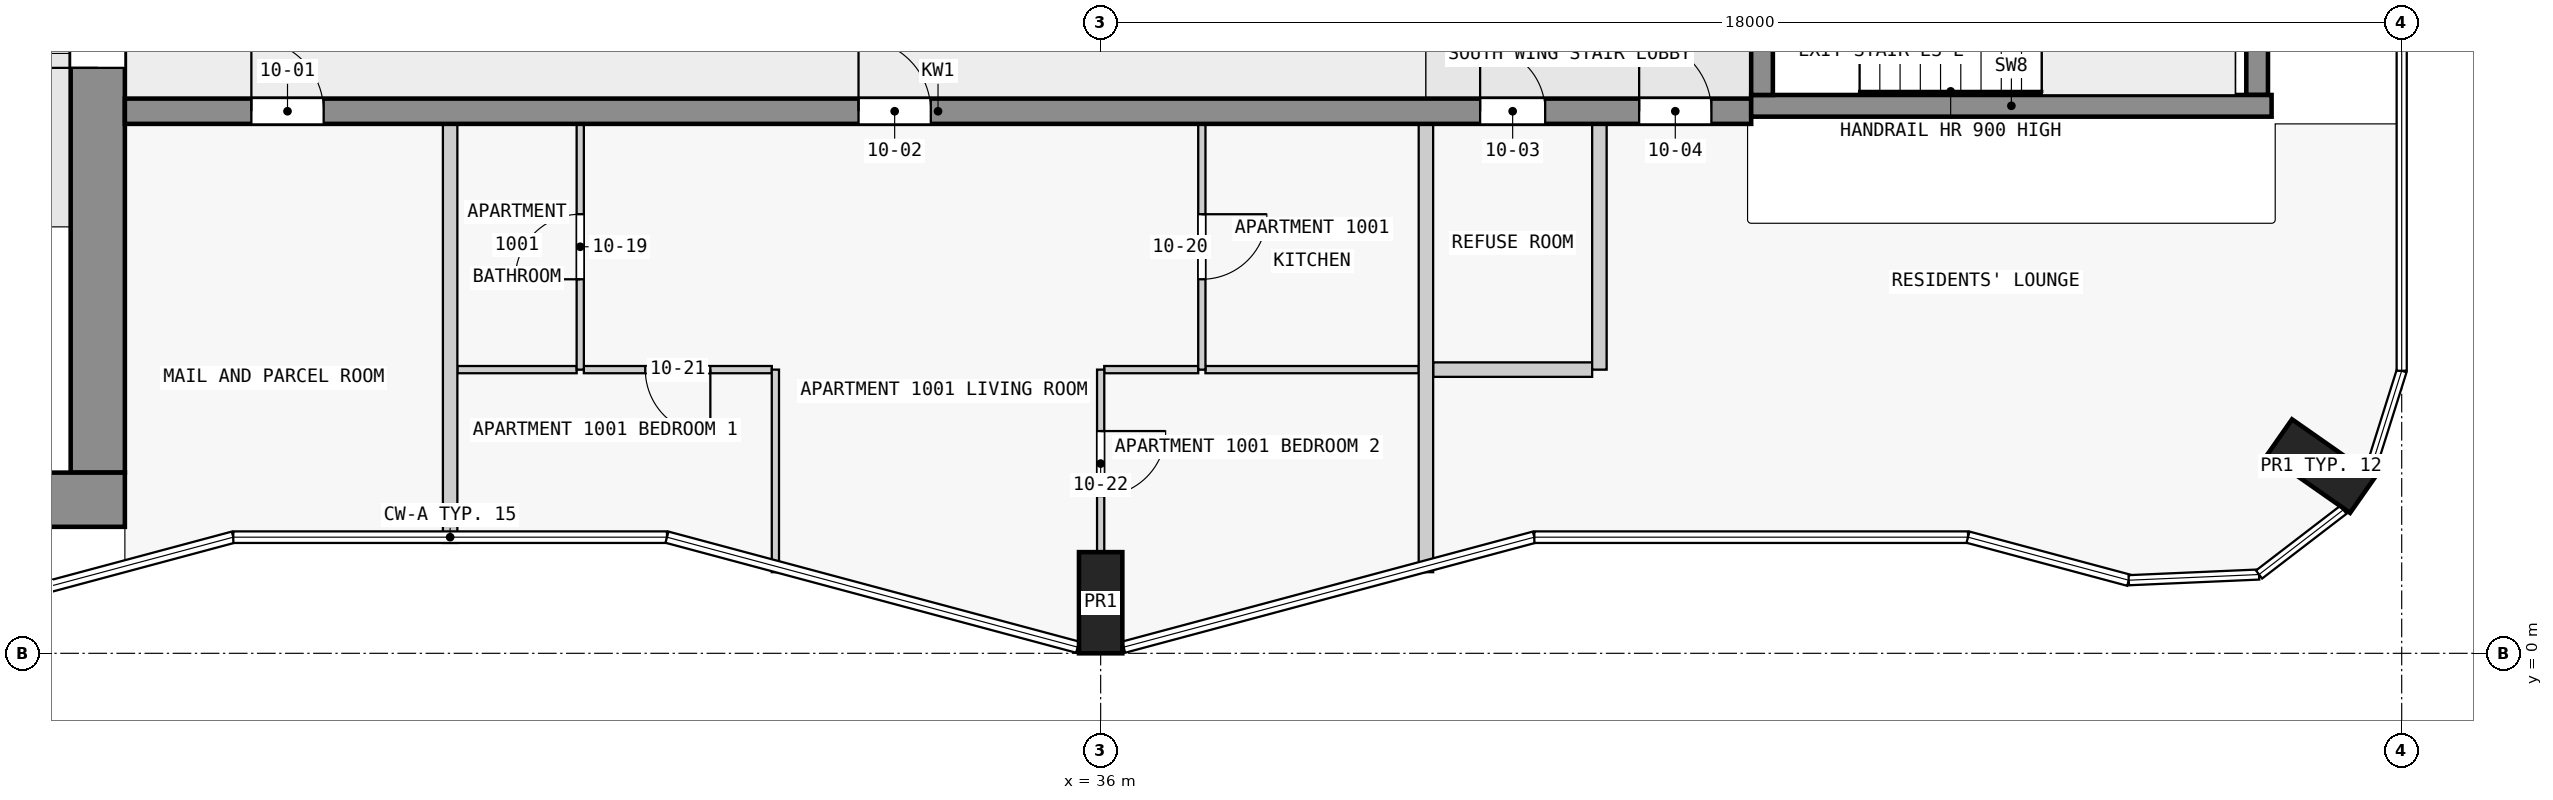
"""IFC4 building model, lengths in metres.
Left out: names, types, materials, properties, quantities, classifications, styles, units other than length and angle.
Written with IfcOpenShell. Run it as: python <this file> out.ifc"""

import sys

from ifc_helpers import new_model, si_unit, direction, frame, frame_2d, origin, origin_2d, place, context, subcontext, project, spatial, rectangle, extrude, element, fill, save


model = new_model("IFC4")
c1 = context("Model", 3, precision=1e-05, world=origin(), true_north=direction((0.0, 1.0)))
c2 = subcontext(c1, "Body", "Model", "MODEL_VIEW")
j1 = project(units=[si_unit("LENGTHUNIT", "METRE"), si_unit("PLANEANGLEUNIT", "RADIAN")], contexts=[c1])
p1 = place(None, origin())
s1 = spatial("IfcSite", under=j1, at=p1, CompositionType="ELEMENT")
p2 = place(p1, origin())
s2 = spatial("IfcBuilding", under=s1, at=p2, CompositionType="ELEMENT")
p3 = place(p2, frame((0.0, 0.0, 44.3)))
s3 = spatial("IfcBuildingStorey", under=s2, at=p3, CompositionType="ELEMENT", Elevation=44.3)
for number, where, z_axis, x_axis in (
    (1, (36.0, 0.7, 0.0), (0.0, 0.0, 1.0), (1.0, 0.0, 0.0)),
    (2, (52.884, 2.59, 0.0), (0.0, 0.0, 1.0), (0.574, 0.819, 0.0)),
):
    element("IfcColumn", number, at=place(p3, frame(where, z_axis=z_axis, x_axis=x_axis)), inside=s3, PredefinedType="COLUMN", context=c2, shape_type="SweptSolid", body=[
        extrude(rectangle(XDim=0.6, YDim=1.4, at=origin_2d()), origin(), (0.0, 0.0, 1.0), 3.5),
    ])
p4 = place(p3, frame((1.55, 2.125, 0.0), z_axis=(0.0, 0.0, 1.0), x_axis=(1.0, 0.0, 0.0)))
e3 = element("IfcWall", 3, at=p4, inside=s3, PredefinedType="SHEAR", context=c2, shape_type="SweptSolid", body=[
    extrude(rectangle(XDim=20.95, YDim=0.75, at=frame_2d((10.475, 0.0))), origin(), (0.0, 0.0, 1.0), 3.25),
])
p5 = place(p3, frame((22.125, 2.5, 0.0), z_axis=(0.0, 0.0, 1.0), x_axis=(0.0, 1.0, 0.0)))
e4 = element("IfcWall", 4, at=p5, inside=s3, PredefinedType="SHEAR", context=c2, shape_type="SweptSolid", body=[
    extrude(rectangle(XDim=14.75, YDim=0.75, at=frame_2d((7.375, 0.0))), origin(), (0.0, 0.0, 1.0), 3.25),
])
p6 = place(p5, frame((5.6, 0.0, 0.0)))
e5 = element("IfcOpeningElement", 5, at=p6, cuts=e4, PredefinedType="OPENING", context=c2, shape_type="SweptSolid", body=[
    extrude(rectangle(XDim=1.8, YDim=2.1, at=frame_2d((0.9, 1.05))), frame((0.0, 0.385, 0.0), z_axis=(0.0, -1.0, 0.0), x_axis=(1.0, 0.0, 0.0)), (0.0, 0.0, 1.0), 0.77),
])
p7 = place(p3, frame((45.15, 7.725, 0.0), z_axis=(0.0, 0.0, 1.0), x_axis=(0.0, 1.0, 0.0)))
e6 = element("IfcWall", 6, at=p7, inside=s3, PredefinedType="SHEAR", context=c2, shape_type="SweptSolid", body=[
    extrude(rectangle(XDim=2.55, YDim=0.3, at=frame_2d((1.275, 0.0))), origin(), (0.0, 0.0, 1.0), 3.5),
])
p8 = place(p7, frame((0.725, 0.0, 0.0)))
e7 = element("IfcOpeningElement", 7, at=p8, cuts=e6, PredefinedType="OPENING", context=c2, shape_type="SweptSolid", body=[
    extrude(rectangle(XDim=1.1, YDim=2.1, at=frame_2d((0.55, 1.05))), frame((0.0, 0.16, 0.0), z_axis=(0.0, -1.0, 0.0), x_axis=(1.0, 0.0, 0.0)), (0.0, 0.0, 1.0), 0.32),
])
p9 = place(p3, frame((52.0, 7.725, 0.0), z_axis=(0.0, 0.0, 1.0), x_axis=(0.0, 1.0, 0.0)))
e8 = element("IfcWall", 8, at=p9, inside=s3, PredefinedType="SHEAR", context=c2, shape_type="SweptSolid", body=[
    extrude(rectangle(XDim=2.55, YDim=0.3, at=frame_2d((1.275, 0.0))), origin(), (0.0, 0.0, 1.0), 3.5),
])
p10 = place(p3, frame((45.0, 7.575, 0.0), z_axis=(0.0, 0.0, 1.0), x_axis=(1.0, 0.0, 0.0)))
e9 = element("IfcWall", 9, at=p10, inside=s3, PredefinedType="SHEAR", context=c2, shape_type="SweptSolid", body=[
    extrude(rectangle(XDim=7.2, YDim=0.3, at=frame_2d((3.6, 0.0))), origin(), (0.0, 0.0, 1.0), 3.5),
])
p11 = place(p3, frame((22.5, 7.5, 0.0), z_axis=(0.0, 0.0, 1.0), x_axis=(1.0, 0.0, 0.0)))
e10 = element("IfcWall", 10, at=p11, inside=s3, PredefinedType="SHEAR", context=c2, shape_type="SweptSolid", body=[
    extrude(rectangle(XDim=22.5, YDim=0.35, at=frame_2d((11.25, 0.0))), origin(), (0.0, 0.0, 1.0), 3.25),
])
p12 = place(p11, frame((1.75, 0.0, 0.0)))
e11 = element("IfcOpeningElement", 11, at=p12, cuts=e10, PredefinedType="OPENING", context=c2, shape_type="SweptSolid", body=[
    extrude(rectangle(XDim=1.0, YDim=2.1, at=frame_2d((0.5, 1.05))), frame((0.0, 0.185, 0.0), z_axis=(0.0, -1.0, 0.0), x_axis=(1.0, 0.0, 0.0)), (0.0, 0.0, 1.0), 0.37),
])
p13 = place(p11, frame((10.15, 0.0, 0.0)))
e12 = element("IfcOpeningElement", 12, at=p13, cuts=e10, PredefinedType="OPENING", context=c2, shape_type="SweptSolid", body=[
    extrude(rectangle(XDim=1.0, YDim=2.1, at=frame_2d((0.5, 1.05))), frame((0.0, 0.185, 0.0), z_axis=(0.0, -1.0, 0.0), x_axis=(1.0, 0.0, 0.0)), (0.0, 0.0, 1.0), 0.37),
])
p14 = place(p11, frame((18.75, 0.0, 0.0)))
e13 = element("IfcOpeningElement", 13, at=p14, cuts=e10, PredefinedType="OPENING", context=c2, shape_type="SweptSolid", body=[
    extrude(rectangle(XDim=0.9, YDim=2.1, at=frame_2d((0.45, 1.05))), frame((0.0, 0.185, 0.0), z_axis=(0.0, -1.0, 0.0), x_axis=(1.0, 0.0, 0.0)), (0.0, 0.0, 1.0), 0.37),
])
p15 = place(p11, frame((20.95, 0.0, 0.0)))
e14 = element("IfcOpeningElement", 14, at=p15, cuts=e10, PredefinedType="OPENING", context=c2, shape_type="SweptSolid", body=[
    extrude(rectangle(XDim=1.0, YDim=2.1, at=frame_2d((0.5, 1.05))), frame((0.0, 0.185, 0.0), z_axis=(0.0, -1.0, 0.0), x_axis=(1.0, 0.0, 0.0)), (0.0, 0.0, 1.0), 0.37),
])
p16 = place(p3, frame((31.45, 3.925, 0.0), z_axis=(0.0, 0.0, 1.0), x_axis=(-1.0, 0.0, 0.0)))
e15 = element("IfcWall", 15, at=p16, inside=s3, PredefinedType="PARTITIONING", context=c2, shape_type="SweptSolid", body=[
    extrude(rectangle(XDim=2.6, YDim=0.1, at=frame_2d((1.3, 0.0))), origin(), (0.0, 0.0, 1.0), 3.25),
])
p17 = place(p16, frame((0.85, 0.0, 0.0)))
e16 = element("IfcOpeningElement", 16, at=p17, cuts=e15, PredefinedType="OPENING", context=c2, shape_type="SweptSolid", body=[
    extrude(rectangle(XDim=0.9, YDim=2.1, at=frame_2d((0.45, 1.05))), frame((0.0, 0.06, 0.0), z_axis=(0.0, -1.0, 0.0), x_axis=(1.0, 0.0, 0.0)), (0.0, 0.0, 1.0), 0.12),
])
p18 = place(p3, frame((37.35, 3.925, 0.0), z_axis=(0.0, 0.0, 1.0), x_axis=(-1.0, 0.0, 0.0)))
e17 = element("IfcWall", 17, at=p18, inside=s3, PredefinedType="PARTITIONING", context=c2, shape_type="SweptSolid", body=[
    extrude(rectangle(XDim=1.3, YDim=0.1, at=frame_2d((0.65, 0.0))), origin(), (0.0, 0.0, 1.0), 3.25),
])
p19 = place(p3, frame((27.1, 3.925, 0.0), z_axis=(0.0, 0.0, 1.0), x_axis=(1.0, 0.0, 0.0)))
e18 = element("IfcWall", 18, at=p19, inside=s3, PredefinedType="PARTITIONING", context=c2, shape_type="SweptSolid", body=[
    extrude(rectangle(XDim=1.65, YDim=0.1, at=frame_2d((0.825, 0.0))), origin(), (0.0, 0.0, 1.0), 3.25),
])
p20 = place(p3, frame((37.45, 3.925, 0.0), z_axis=(0.0, 0.0, 1.0), x_axis=(1.0, 0.0, 0.0)))
e19 = element("IfcWall", 19, at=p20, inside=s3, PredefinedType="PARTITIONING", context=c2, shape_type="SweptSolid", body=[
    extrude(rectangle(XDim=2.95, YDim=0.1, at=frame_2d((1.475, 0.0))), origin(), (0.0, 0.0, 1.0), 3.25),
])
p21 = place(p3, frame((40.6, 3.925, 0.0), z_axis=(0.0, 0.0, 1.0), x_axis=(1.0, 0.0, 0.0)))
e20 = element("IfcWall", 20, at=p21, inside=s3, PredefinedType="PARTITIONING", context=c2, shape_type="SweptSolid", body=[
    extrude(rectangle(XDim=2.2, YDim=0.2, at=frame_2d((1.1, 0.0))), origin(), (0.0, 0.0, 1.0), 3.25),
])
p22 = place(p3, frame((27.0, 1.527, 0.0), z_axis=(0.0, 0.0, 1.0), x_axis=(0.0, 1.0, 0.0)))
e21 = element("IfcWall", 21, at=p22, inside=s3, PredefinedType="PARTITIONING", context=c2, shape_type="SweptSolid", body=[
    extrude(rectangle(XDim=5.798, YDim=0.2, at=frame_2d((2.899, 0.0))), origin(), (0.0, 0.0, 1.0), 3.25),
])
p23 = place(p3, frame((28.8, 3.925, 0.0), z_axis=(0.0, 0.0, 1.0), x_axis=(0.0, 1.0, 0.0)))
e22 = element("IfcWall", 22, at=p23, inside=s3, PredefinedType="PARTITIONING", context=c2, shape_type="SweptSolid", body=[
    extrude(rectangle(XDim=3.4, YDim=0.1, at=frame_2d((1.7, 0.0))), origin(), (0.0, 0.0, 1.0), 3.25),
])
p24 = place(p23, frame((1.25, 0.0, 0.0)))
e23 = element("IfcOpeningElement", 23, at=p24, cuts=e22, PredefinedType="OPENING", context=c2, shape_type="SweptSolid", body=[
    extrude(rectangle(XDim=0.9, YDim=2.1, at=frame_2d((0.45, 1.05))), frame((0.0, 0.06, 0.0), z_axis=(0.0, -1.0, 0.0), x_axis=(1.0, 0.0, 0.0)), (0.0, 0.0, 1.0), 0.12),
])
p25 = place(p3, frame((31.5, 1.122, 0.0), z_axis=(0.0, 0.0, 1.0), x_axis=(0.0, 1.0, 0.0)))
e24 = element("IfcWall", 24, at=p25, inside=s3, PredefinedType="PARTITIONING", context=c2, shape_type="SweptSolid", body=[
    extrude(rectangle(XDim=2.803, YDim=0.1, at=frame_2d((1.401, 0.0))), origin(), (0.0, 0.0, 1.0), 3.25),
])
p26 = place(p3, frame((36.0, 3.925, 0.0), z_axis=(0.0, 0.0, 1.0), x_axis=(0.0, -1.0, 0.0)))
e25 = element("IfcWall", 25, at=p26, inside=s3, PredefinedType="PARTITIONING", context=c2, shape_type="SweptSolid", body=[
    extrude(rectangle(XDim=2.525, YDim=0.1, at=frame_2d((1.263, 0.0))), origin(), (0.0, 0.0, 1.0), 3.25),
])
p27 = place(p26, frame((0.85, 0.0, 0.0)))
e26 = element("IfcOpeningElement", 26, at=p27, cuts=e25, PredefinedType="OPENING", context=c2, shape_type="SweptSolid", body=[
    extrude(rectangle(XDim=0.9, YDim=2.1, at=frame_2d((0.45, 1.05))), frame((0.0, 0.06, 0.0), z_axis=(0.0, -1.0, 0.0), x_axis=(1.0, 0.0, 0.0)), (0.0, 0.0, 1.0), 0.12),
])
p28 = place(p3, frame((37.4, 7.325, 0.0), z_axis=(0.0, 0.0, 1.0), x_axis=(0.0, -1.0, 0.0)))
e27 = element("IfcWall", 27, at=p28, inside=s3, PredefinedType="PARTITIONING", context=c2, shape_type="SweptSolid", body=[
    extrude(rectangle(XDim=3.4, YDim=0.1, at=frame_2d((1.7, 0.0))), origin(), (0.0, 0.0, 1.0), 3.25),
])
p29 = place(p28, frame((1.25, 0.0, 0.0)))
e28 = element("IfcOpeningElement", 28, at=p29, cuts=e27, PredefinedType="OPENING", context=c2, shape_type="SweptSolid", body=[
    extrude(rectangle(XDim=0.9, YDim=2.1, at=frame_2d((0.45, 1.05))), frame((0.0, 0.06, 0.0), z_axis=(0.0, -1.0, 0.0), x_axis=(1.0, 0.0, 0.0)), (0.0, 0.0, 1.0), 0.12),
])
p30 = place(p3, frame((40.5, 1.122, 0.0), z_axis=(0.0, 0.0, 1.0), x_axis=(0.0, 1.0, 0.0)))
e29 = element("IfcWall", 29, at=p30, inside=s3, PredefinedType="PARTITIONING", context=c2, shape_type="SweptSolid", body=[
    extrude(rectangle(XDim=6.203, YDim=0.2, at=frame_2d((3.101, 0.0))), origin(), (0.0, 0.0, 1.0), 3.25),
])
p31 = place(p3, frame((42.9, 3.925, 0.0), z_axis=(0.0, 0.0, 1.0), x_axis=(0.0, 1.0, 0.0)))
e30 = element("IfcWall", 30, at=p31, inside=s3, PredefinedType="PARTITIONING", context=c2, shape_type="SweptSolid", body=[
    extrude(rectangle(XDim=3.4, YDim=0.2, at=frame_2d((1.7, 0.0))), origin(), (0.0, 0.0, 1.0), 3.25),
])
p32 = place(p6, origin())
e31 = element("IfcDoor", 31, at=p32, inside=s3, OperationType="DOUBLE_DOOR_SINGLE_SWING", PredefinedType="DOOR", context=c2, shape_type="SweptSolid", body=[
    extrude(rectangle(XDim=1.8, YDim=2.1, at=frame_2d((0.9, 1.05))), frame((0.0, 0.025, 0.0), z_axis=(0.0, -1.0, 0.0), x_axis=(1.0, 0.0, 0.0)), (0.0, 0.0, 1.0), 0.05),
])
fill(e5, e31)
p33 = place(p12, origin())
e32 = element("IfcDoor", 32, at=p33, inside=s3, OperationType="SINGLE_SWING_LEFT", PredefinedType="DOOR", context=c2, shape_type="SweptSolid", body=[
    extrude(rectangle(XDim=1.0, YDim=2.1, at=frame_2d((0.5, 1.05))), frame((0.0, 0.025, 0.0), z_axis=(0.0, -1.0, 0.0), x_axis=(1.0, 0.0, 0.0)), (0.0, 0.0, 1.0), 0.05),
])
fill(e11, e32)
p34 = place(p13, origin())
e33 = element("IfcDoor", 33, at=p34, inside=s3, OperationType="SINGLE_SWING_LEFT", PredefinedType="DOOR", context=c2, shape_type="SweptSolid", body=[
    extrude(rectangle(XDim=1.0, YDim=2.1, at=frame_2d((0.5, 1.05))), frame((0.0, 0.025, 0.0), z_axis=(0.0, -1.0, 0.0), x_axis=(1.0, 0.0, 0.0)), (0.0, 0.0, 1.0), 0.05),
])
fill(e12, e33)
p35 = place(p14, origin())
e34 = element("IfcDoor", 34, at=p35, inside=s3, OperationType="SINGLE_SWING_RIGHT", PredefinedType="DOOR", context=c2, shape_type="SweptSolid", body=[
    extrude(rectangle(XDim=0.9, YDim=2.1, at=frame_2d((0.45, 1.05))), frame((0.0, 0.025, 0.0), z_axis=(0.0, -1.0, 0.0), x_axis=(1.0, 0.0, 0.0)), (0.0, 0.0, 1.0), 0.05),
])
fill(e13, e34)
p36 = place(p15, origin())
e35 = element("IfcDoor", 35, at=p36, inside=s3, OperationType="SINGLE_SWING_RIGHT", PredefinedType="DOOR", context=c2, shape_type="SweptSolid", body=[
    extrude(rectangle(XDim=1.0, YDim=2.1, at=frame_2d((0.5, 1.05))), frame((0.0, 0.025, 0.0), z_axis=(0.0, -1.0, 0.0), x_axis=(1.0, 0.0, 0.0)), (0.0, 0.0, 1.0), 0.05),
])
fill(e14, e35)
p37 = place(p24, origin())
e36 = element("IfcDoor", 36, at=p37, inside=s3, OperationType="SINGLE_SWING_LEFT", PredefinedType="DOOR", context=c2, shape_type="SweptSolid", body=[
    extrude(rectangle(XDim=0.9, YDim=2.1, at=frame_2d((0.45, 1.05))), frame((0.0, 0.025, 0.0), z_axis=(0.0, -1.0, 0.0), x_axis=(1.0, 0.0, 0.0)), (0.0, 0.0, 1.0), 0.05),
])
fill(e23, e36)
p38 = place(p29, origin())
e37 = element("IfcDoor", 37, at=p38, inside=s3, OperationType="SINGLE_SWING_LEFT", PredefinedType="DOOR", context=c2, shape_type="SweptSolid", body=[
    extrude(rectangle(XDim=0.9, YDim=2.1, at=frame_2d((0.45, 1.05))), frame((0.0, 0.025, 0.0), z_axis=(0.0, -1.0, 0.0), x_axis=(1.0, 0.0, 0.0)), (0.0, 0.0, 1.0), 0.05),
])
fill(e28, e37)
p39 = place(p17, origin())
e38 = element("IfcDoor", 38, at=p39, inside=s3, OperationType="SINGLE_SWING_RIGHT", PredefinedType="DOOR", context=c2, shape_type="SweptSolid", body=[
    extrude(rectangle(XDim=0.9, YDim=2.1, at=frame_2d((0.45, 1.05))), frame((0.0, 0.025, 0.0), z_axis=(0.0, -1.0, 0.0), x_axis=(1.0, 0.0, 0.0)), (0.0, 0.0, 1.0), 0.05),
])
fill(e16, e38)
p40 = place(p27, origin())
e39 = element("IfcDoor", 39, at=p40, inside=s3, OperationType="SINGLE_SWING_RIGHT", PredefinedType="DOOR", context=c2, shape_type="SweptSolid", body=[
    extrude(rectangle(XDim=0.9, YDim=2.1, at=frame_2d((0.45, 1.05))), frame((0.0, 0.025, 0.0), z_axis=(0.0, -1.0, 0.0), x_axis=(1.0, 0.0, 0.0)), (0.0, 0.0, 1.0), 0.05),
])
fill(e26, e39)
save(model, sys.argv[1])
